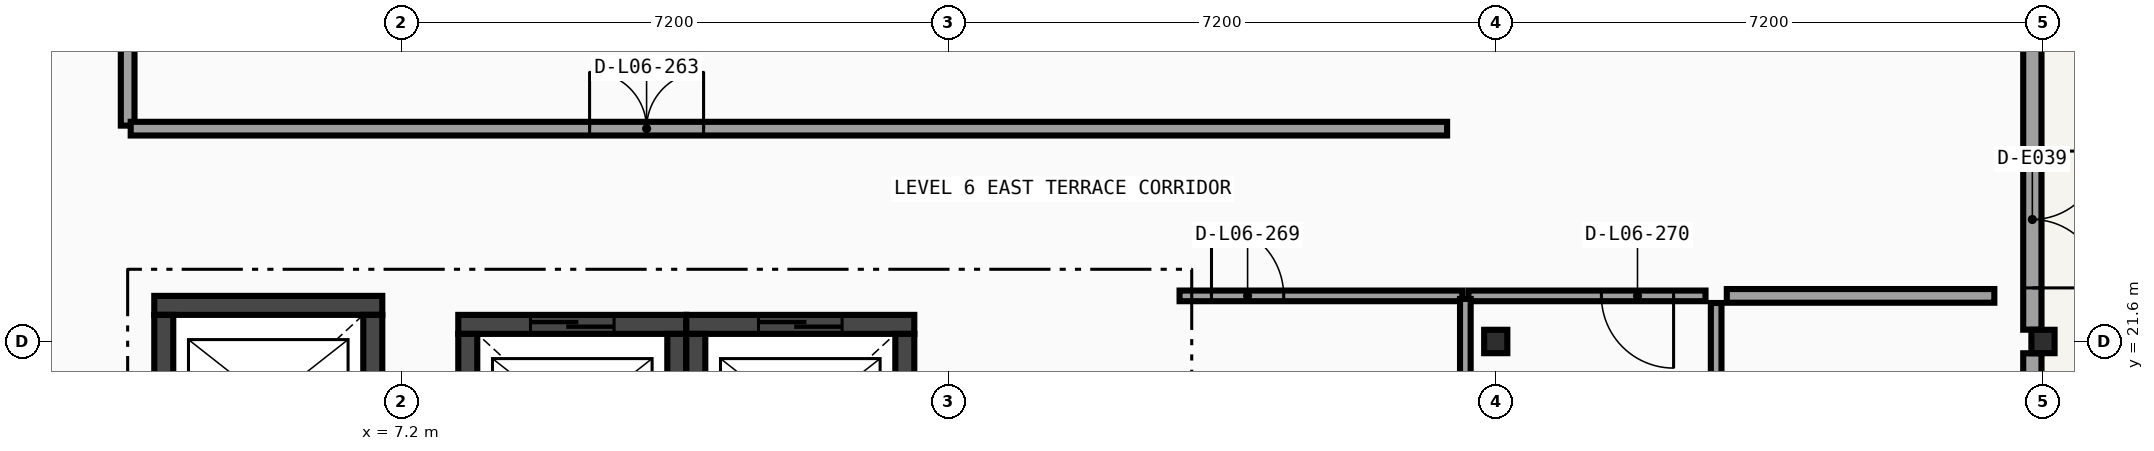
"""IFC4 building model, lengths in metres.
Left out: names, types, materials, properties, quantities, classifications, styles, units other than length and angle.
Written with IfcOpenShell. Run it as: python <this file> out.ifc"""

import sys

from ifc_helpers import new_model, si_unit, direction, frame, frame_2d, origin, origin_2d, place, context, subcontext, project, spatial, rectangle, i_section, extrude, element, fill, save


model = new_model("IFC4")
c1 = context("Model", 3, precision=1e-05, world=origin(), true_north=direction((0.0, 1.0)))
c2 = subcontext(c1, "Body", "Model", "MODEL_VIEW")
j1 = project(units=[si_unit("LENGTHUNIT", "METRE"), si_unit("PLANEANGLEUNIT", "RADIAN")], contexts=[c1])
p1 = place(None, origin())
s1 = spatial("IfcSite", under=j1, at=p1, CompositionType="ELEMENT")
p2 = place(p1, origin())
s2 = spatial("IfcBuilding", under=s1, at=p2, CompositionType="ELEMENT")
p3 = place(p2, frame((0.0, 0.0, 27.0)))
s3 = spatial("IfcBuildingStorey", under=s2, at=p3, CompositionType="ELEMENT", Elevation=27.0)
for number, where, z_axis, x_axis in (
    (1, (21.6, 21.6, 0.0), (0.0, 0.0, 1.0), (1.0, 0.0, 0.0)),
    (2, (28.8, 21.6, 0.0), (0.0, 0.0, 1.0), (1.0, 0.0, 0.0)),
):
    element("IfcColumn", number, at=place(p3, frame(where, z_axis=z_axis, x_axis=x_axis)), inside=s3, PredefinedType="COLUMN", context=c2, shape_type="SweptSolid", body=[
        extrude(i_section(OverallWidth=0.305, OverallDepth=0.308, WebThickness=0.01, FlangeThickness=0.015, FilletRadius=0.015, at=origin_2d()), origin(), (0.0, 0.0, 1.0), 4.05),
    ])
p4 = place(p3, frame((28.66, 14.555, 0.0), z_axis=(0.0, 0.0, 1.0), x_axis=(0.0, 1.0, 0.0)))
e3 = element("IfcWall", 3, at=p4, inside=s3, PredefinedType="SOLIDWALL", context=c2, shape_type="SweptSolid", body=[
    extrude(rectangle(XDim=6.89, YDim=0.24, at=frame_2d((3.445, 0.0))), origin(), (0.0, 0.0, 1.0), 3.256),
])
p5 = place(p4, frame((0.55, 0.0, 0.0)))
e4 = element("IfcOpeningElement", 4, at=p5, cuts=e3, PredefinedType="OPENING", context=c2, shape_type="SweptSolid", body=[
    extrude(rectangle(XDim=1.8, YDim=2.15, at=frame_2d((0.9, 1.075))), frame((0.0, 0.13, 0.0), z_axis=(0.0, -1.0, 0.0), x_axis=(1.0, 0.0, 0.0)), (0.0, 0.0, 1.0), 0.26),
])
p6 = place(p4, frame((5.04, 0.0, 0.85)))
e5 = element("IfcOpeningElement", 5, at=p6, cuts=e3, PredefinedType="OPENING", context=c2, shape_type="SweptSolid", body=[
    extrude(rectangle(XDim=1.35, YDim=1.85, at=frame_2d((0.675, 0.925))), frame((0.0, 0.13, 0.0), z_axis=(0.0, -1.0, 0.0), x_axis=(1.0, 0.0, 0.0)), (0.0, 0.0, 1.0), 0.26),
])
p7 = place(p3, frame((28.66, 21.755, 0.0), z_axis=(0.0, 0.0, 1.0), x_axis=(0.0, 1.0, 0.0)))
e6 = element("IfcWall", 6, at=p7, inside=s3, PredefinedType="SOLIDWALL", context=c2, shape_type="SweptSolid", body=[
    extrude(rectangle(XDim=6.89, YDim=0.24, at=frame_2d((3.445, 0.0))), origin(), (0.0, 0.0, 1.0), 3.256),
])
p8 = place(p7, frame((0.55, 0.0, 0.0)))
e7 = element("IfcOpeningElement", 7, at=p8, cuts=e6, PredefinedType="OPENING", context=c2, shape_type="SweptSolid", body=[
    extrude(rectangle(XDim=1.8, YDim=2.15, at=frame_2d((0.9, 1.075))), frame((0.0, 0.13, 0.0), z_axis=(0.0, -1.0, 0.0), x_axis=(1.0, 0.0, 0.0)), (0.0, 0.0, 1.0), 0.26),
])
p9 = place(p7, frame((5.04, 0.0, 0.85)))
e8 = element("IfcOpeningElement", 8, at=p9, cuts=e6, PredefinedType="OPENING", context=c2, shape_type="SweptSolid", body=[
    extrude(rectangle(XDim=1.35, YDim=1.85, at=frame_2d((0.675, 0.925))), frame((0.0, 0.13, 0.0), z_axis=(0.0, -1.0, 0.0), x_axis=(1.0, 0.0, 0.0)), (0.0, 0.0, 1.0), 0.26),
])
p10 = place(p3, frame((6.95, 22.075, 0.0), z_axis=(0.0, 0.0, 1.0), x_axis=(-1.0, 0.0, 0.0)))
e9 = element("IfcWall", 9, at=p10, inside=s3, PredefinedType="SHEAR", context=c2, shape_type="SweptSolid", body=[
    extrude(rectangle(XDim=3.0, YDim=0.25, at=frame_2d((1.5, 0.0))), origin(), (0.0, 0.0, 1.0), 3.8),
])
for number, where, z_axis, x_axis in (
    (10, (4.075, 21.95, 0.0), (0.0, 0.0, 1.0), (0.0, -1.0, 0.0)),
    (11, (6.825, 19.65, 0.0), (0.0, 0.0, 1.0), (0.0, 1.0, 0.0)),
):
    element("IfcWall", number, at=place(p3, frame(where, z_axis=z_axis, x_axis=x_axis)), inside=s3, PredefinedType="SHEAR", context=c2, shape_type="SweptSolid", body=[
        extrude(rectangle(XDim=2.3, YDim=0.25, at=frame_2d((1.15, 0.0))), origin(), (0.0, 0.0, 1.0), 3.8),
    ])
p11 = place(p3, frame((10.95, 21.825, 0.0), z_axis=(0.0, 0.0, 1.0), x_axis=(-1.0, 0.0, 0.0)))
e12 = element("IfcWall", 12, at=p11, inside=s3, PredefinedType="SHEAR", context=c2, shape_type="SweptSolid", body=[
    extrude(rectangle(XDim=3.0, YDim=0.25, at=frame_2d((1.5, 0.0))), origin(), (0.0, 0.0, 1.0), 3.8),
])
p12 = place(p11, frame((0.95, 0.0, 0.0)))
e13 = element("IfcOpeningElement", 13, at=p12, cuts=e12, PredefinedType="OPENING", context=c2, shape_type="SweptSolid", body=[
    extrude(rectangle(XDim=1.1, YDim=2.1, at=frame_2d((0.55, 1.05))), frame((0.0, 0.135, 0.0), z_axis=(0.0, -1.0, 0.0), x_axis=(1.0, 0.0, 0.0)), (0.0, 0.0, 1.0), 0.27),
])
for number, where, z_axis, x_axis in (
    (14, (8.075, 21.7, 0.0), (0.0, 0.0, 1.0), (0.0, -1.0, 0.0)),
    (15, (10.825, 19.4, 0.0), (0.0, 0.0, 1.0), (0.0, 1.0, 0.0)),
):
    element("IfcWall", number, at=place(p3, frame(where, z_axis=z_axis, x_axis=x_axis)), inside=s3, PredefinedType="SHEAR", context=c2, shape_type="SweptSolid", body=[
        extrude(rectangle(XDim=2.3, YDim=0.25, at=frame_2d((1.15, 0.0))), origin(), (0.0, 0.0, 1.0), 3.8),
    ])
p13 = place(p3, frame((13.95, 21.825, 0.0), z_axis=(0.0, 0.0, 1.0), x_axis=(-1.0, 0.0, 0.0)))
e16 = element("IfcWall", 16, at=p13, inside=s3, PredefinedType="SHEAR", context=c2, shape_type="SweptSolid", body=[
    extrude(rectangle(XDim=3.0, YDim=0.25, at=frame_2d((1.5, 0.0))), origin(), (0.0, 0.0, 1.0), 3.8),
])
p14 = place(p13, frame((0.95, 0.0, 0.0)))
e17 = element("IfcOpeningElement", 17, at=p14, cuts=e16, PredefinedType="OPENING", context=c2, shape_type="SweptSolid", body=[
    extrude(rectangle(XDim=1.1, YDim=2.1, at=frame_2d((0.55, 1.05))), frame((0.0, 0.135, 0.0), z_axis=(0.0, -1.0, 0.0), x_axis=(1.0, 0.0, 0.0)), (0.0, 0.0, 1.0), 0.27),
])
for number, where, z_axis, x_axis in (
    (18, (11.075, 21.7, 0.0), (0.0, 0.0, 1.0), (0.0, -1.0, 0.0)),
    (19, (13.825, 19.4, 0.0), (0.0, 0.0, 1.0), (0.0, 1.0, 0.0)),
):
    element("IfcWall", number, at=place(p3, frame(where, z_axis=z_axis, x_axis=x_axis)), inside=s3, PredefinedType="SHEAR", context=c2, shape_type="SweptSolid", body=[
        extrude(rectangle(XDim=2.3, YDim=0.25, at=frame_2d((1.15, 0.0))), origin(), (0.0, 0.0, 1.0), 3.8),
    ])
p15 = place(p3, frame((3.6, 24.44, 0.0), z_axis=(0.0, 0.0, 1.0), x_axis=(0.0, 1.0, 0.0)))
e20 = element("IfcWall", 20, at=p15, inside=s3, PredefinedType="PARTITIONING", context=c2, shape_type="SweptSolid", body=[
    extrude(rectangle(XDim=11.32, YDim=0.18, at=frame_2d((5.66, 0.0))), origin(), (0.0, 0.0, 1.0), 3.246),
])
p16 = place(p3, frame((24.64, 22.2, 0.0), z_axis=(0.0, 0.0, 1.0), x_axis=(1.0, 0.0, 0.0)))
e21 = element("IfcWall", 21, at=p16, inside=s3, PredefinedType="PARTITIONING", context=c2, shape_type="SweptSolid", body=[
    extrude(rectangle(XDim=3.52, YDim=0.18, at=frame_2d((1.76, 0.0))), origin(), (0.0, 0.0, 1.0), 3.8),
])
p17 = place(p3, frame((3.64, 24.4, 0.0), z_axis=(0.0, 0.0, 1.0), x_axis=(1.0, 0.0, 0.0)))
e22 = element("IfcWall", 22, at=p17, inside=s3, PredefinedType="PARTITIONING", context=c2, shape_type="SweptSolid", body=[
    extrude(rectangle(XDim=17.32, YDim=0.18, at=frame_2d((8.66, 0.0))), origin(), (0.0, 0.0, 1.0), 3.8),
])
p18 = place(p17, frame((6.038, 0.0, 0.0)))
e23 = element("IfcOpeningElement", 23, at=p18, cuts=e22, PredefinedType="OPENING", context=c2, shape_type="SweptSolid", body=[
    extrude(rectangle(XDim=1.5, YDim=2.1, at=frame_2d((0.75, 1.05))), frame((0.0, 0.1, 0.0), z_axis=(0.0, -1.0, 0.0), x_axis=(1.0, 0.0, 0.0)), (0.0, 0.0, 1.0), 0.2),
])
p19 = place(p3, frame((17.44, 22.2, 0.0), z_axis=(0.0, 0.0, 1.0), x_axis=(1.0, 0.0, 0.0)))
e24 = element("IfcWall", 24, at=p19, inside=s3, PredefinedType="PARTITIONING", context=c2, shape_type="SweptSolid", body=[
    extrude(rectangle(XDim=3.72, YDim=0.14, at=frame_2d((1.86, 0.0))), origin(), (0.0, 0.0, 1.0), 3.8),
])
p20 = place(p19, frame((0.42, 0.0, 0.0)))
e25 = element("IfcOpeningElement", 25, at=p20, cuts=e24, PredefinedType="OPENING", context=c2, shape_type="SweptSolid", body=[
    extrude(rectangle(XDim=0.95, YDim=2.08, at=frame_2d((0.475, 1.04))), frame((0.0, 0.08, 0.0), z_axis=(0.0, -1.0, 0.0), x_axis=(1.0, 0.0, 0.0)), (0.0, 0.0, 1.0), 0.16),
])
p21 = place(p3, frame((21.24, 22.2, 0.0), z_axis=(0.0, 0.0, 1.0), x_axis=(1.0, 0.0, 0.0)))
e26 = element("IfcWall", 26, at=p21, inside=s3, PredefinedType="PARTITIONING", context=c2, shape_type="SweptSolid", body=[
    extrude(rectangle(XDim=3.12, YDim=0.14, at=frame_2d((1.56, 0.0))), origin(), (0.0, 0.0, 1.0), 3.246),
])
p22 = place(p21, frame((1.75, 0.0, 0.0)))
e27 = element("IfcOpeningElement", 27, at=p22, cuts=e26, PredefinedType="OPENING", context=c2, shape_type="SweptSolid", body=[
    extrude(rectangle(XDim=0.95, YDim=2.08, at=frame_2d((0.475, 1.04))), frame((0.0, 0.08, 0.0), z_axis=(0.0, -1.0, 0.0), x_axis=(1.0, 0.0, 0.0)), (0.0, 0.0, 1.0), 0.16),
])
p23 = place(p3, frame((24.5, 15.071, 0.0), z_axis=(0.0, 0.0, 1.0), x_axis=(0.0, 1.0, 0.0)))
e28 = element("IfcWall", 28, at=p23, inside=s3, PredefinedType="PARTITIONING", context=c2, shape_type="SweptSolid", body=[
    extrude(rectangle(XDim=7.035, YDim=0.14, at=frame_2d((3.518, 0.0))), origin(), (0.0, 0.0, 1.0), 3.246),
])
p24 = place(p3, frame((21.2, 18.44, 0.0), z_axis=(0.0, 0.0, 1.0), x_axis=(0.0, 1.0, 0.0)))
e29 = element("IfcWall", 29, at=p24, inside=s3, PredefinedType="PARTITIONING", context=c2, shape_type="SweptSolid", body=[
    extrude(rectangle(XDim=3.72, YDim=0.14, at=frame_2d((1.86, 0.0))), origin(), (0.0, 0.0, 1.0), 3.8),
])
p25 = place(p8, frame((1.8, 0.0, 0.0), z_axis=(0.0, 0.0, 1.0), x_axis=(-1.0, 0.0, 0.0)))
e30 = element("IfcDoor", 30, at=p25, inside=s3, OperationType="DOUBLE_DOOR_SINGLE_SWING", PredefinedType="DOOR", context=c2, shape_type="SweptSolid", body=[
    extrude(rectangle(XDim=1.8, YDim=2.15, at=frame_2d((0.9, 1.075))), frame((0.0, 0.025, 0.0), z_axis=(0.0, -1.0, 0.0), x_axis=(1.0, 0.0, 0.0)), (0.0, 0.0, 1.0), 0.05),
])
fill(e7, e30)
p26 = place(p12, origin())
e31 = element("IfcDoor", 31, at=p26, inside=s3, OperationType="SLIDING_TO_LEFT", PredefinedType="DOOR", context=c2, shape_type="SweptSolid", body=[
    extrude(rectangle(XDim=1.1, YDim=2.1, at=frame_2d((0.55, 1.05))), frame((0.0, 0.025, 0.0), z_axis=(0.0, -1.0, 0.0), x_axis=(1.0, 0.0, 0.0)), (0.0, 0.0, 1.0), 0.05),
])
fill(e13, e31)
p27 = place(p14, origin())
e32 = element("IfcDoor", 32, at=p27, inside=s3, OperationType="SLIDING_TO_LEFT", PredefinedType="DOOR", context=c2, shape_type="SweptSolid", body=[
    extrude(rectangle(XDim=1.1, YDim=2.1, at=frame_2d((0.55, 1.05))), frame((0.0, 0.025, 0.0), z_axis=(0.0, -1.0, 0.0), x_axis=(1.0, 0.0, 0.0)), (0.0, 0.0, 1.0), 0.05),
])
fill(e17, e32)
p28 = place(p18, origin())
e33 = element("IfcDoor", 33, at=p28, inside=s3, OperationType="DOUBLE_DOOR_SINGLE_SWING", PredefinedType="DOOR", context=c2, shape_type="SweptSolid", body=[
    extrude(rectangle(XDim=1.5, YDim=2.1, at=frame_2d((0.75, 1.05))), frame((0.0, 0.025, 0.0), z_axis=(0.0, -1.0, 0.0), x_axis=(1.0, 0.0, 0.0)), (0.0, 0.0, 1.0), 0.05),
])
fill(e23, e33)
p29 = place(p20, origin())
e34 = element("IfcDoor", 34, at=p29, inside=s3, OperationType="SINGLE_SWING_LEFT", PredefinedType="DOOR", context=c2, shape_type="SweptSolid", body=[
    extrude(rectangle(XDim=0.95, YDim=2.08, at=frame_2d((0.475, 1.04))), frame((0.0, 0.025, 0.0), z_axis=(0.0, -1.0, 0.0), x_axis=(1.0, 0.0, 0.0)), (0.0, 0.0, 1.0), 0.05),
])
fill(e25, e34)
p30 = place(p22, origin())
e35 = element("IfcDoor", 35, at=p30, inside=s3, OperationType="SINGLE_SWING_RIGHT", PredefinedType="DOOR", context=c2, shape_type="SweptSolid", body=[
    extrude(rectangle(XDim=0.95, YDim=2.08, at=frame_2d((0.475, 1.04))), frame((0.0, 0.025, 0.0), z_axis=(0.0, -1.0, 0.0), x_axis=(1.0, 0.0, 0.0)), (0.0, 0.0, 1.0), 0.05),
])
fill(e27, e35)
save(model, sys.argv[1])
